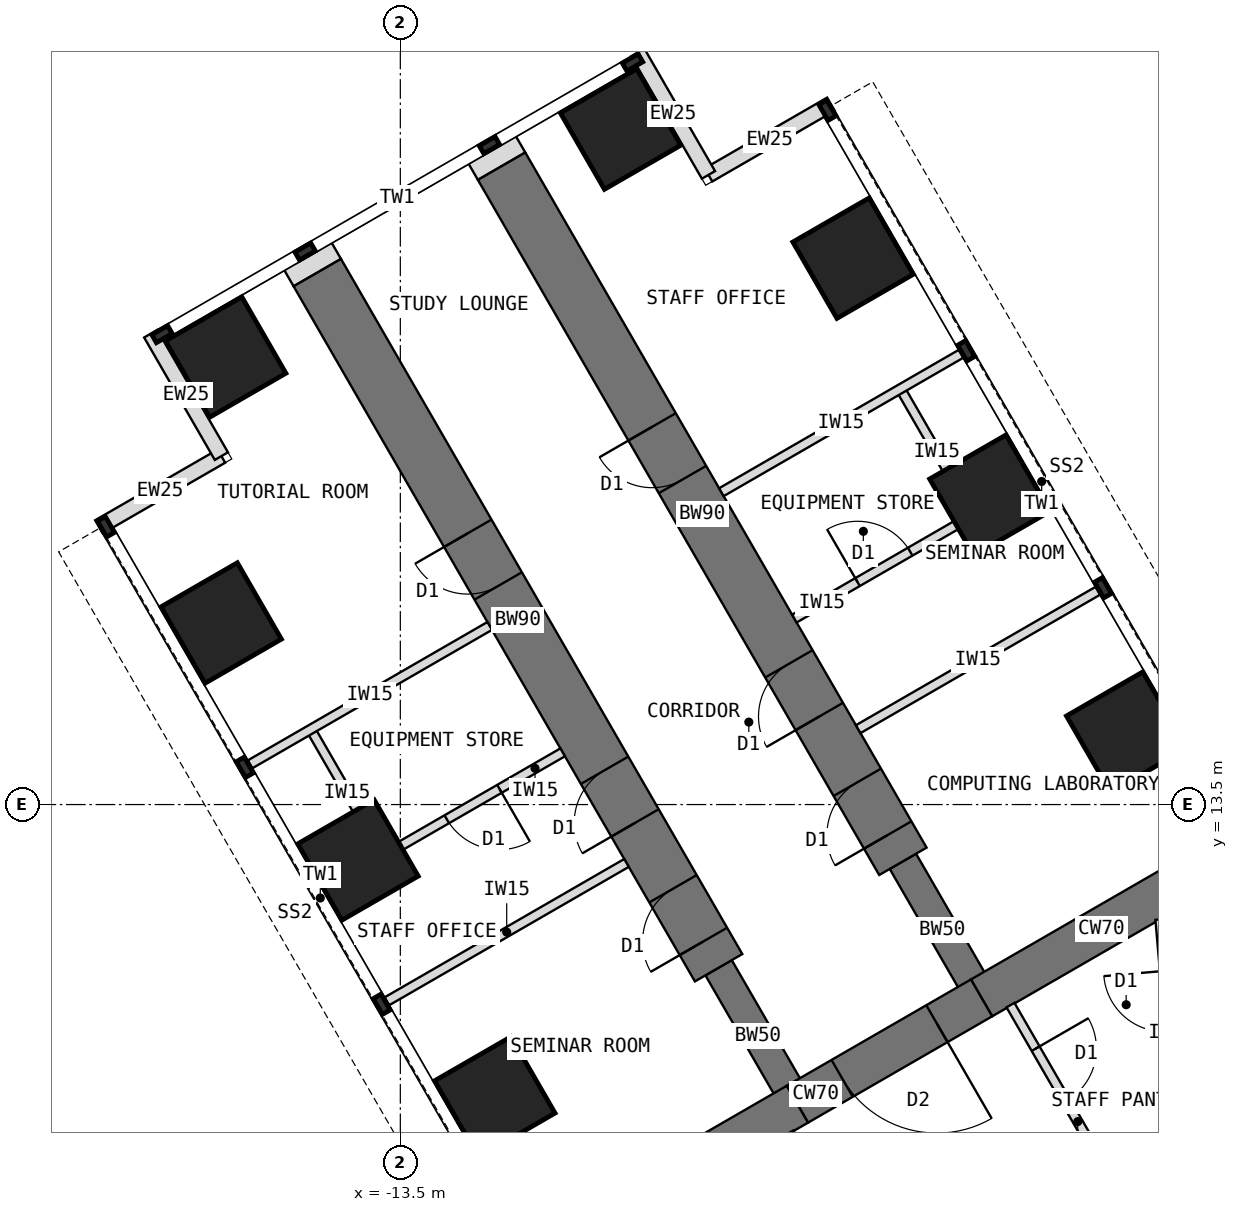
"""IFC4 building model, lengths in metres.
Left out: names, types, materials, properties, quantities, classifications, styles, units other than length and angle.
Written with IfcOpenShell. Run it as: python <this file> out.ifc"""

import sys

from ifc_helpers import new_model, si_unit, direction, frame, frame_2d, origin, origin_2d, place, context, subcontext, project, spatial, rectangle, extrude, element, fill, save


model = new_model("IFC4")
c1 = context("Model", 3, precision=1e-05, world=origin(), true_north=direction((0.0, 1.0)))
c2 = subcontext(c1, "Body", "Model", "MODEL_VIEW")
j1 = project(units=[si_unit("LENGTHUNIT", "METRE"), si_unit("PLANEANGLEUNIT", "RADIAN")], contexts=[c1])
p1 = place(None, origin())
s1 = spatial("IfcSite", under=j1, at=p1, CompositionType="ELEMENT")
p2 = place(p1, origin())
s2 = spatial("IfcBuilding", under=s1, at=p2, CompositionType="ELEMENT")
p3 = place(p2, frame((0.0, 0.0, 60.5)))
s3 = spatial("IfcBuildingStorey", under=s2, at=p3, CompositionType="ELEMENT", Elevation=60.5)
p4 = place(p3, frame((0.0, 12.596, 0.0), z_axis=(0.0, 0.0, 1.0), x_axis=(-0.866011268655, -0.500024481964, 0.0)))
e1 = element("IfcWall", 1, at=p4, inside=s3, PredefinedType="SHEAR", context=c2, shape_type="SweptSolid", body=[
    extrude(rectangle(XDim=4.548, YDim=0.7, at=frame_2d((2.274, 0.0))), origin(), (0.0, 0.0, 1.0), 4.0),
])
p5 = place(p3, frame((-3.939, 10.322, 0.0), z_axis=(0.0, 0.0, 1.0), x_axis=(-0.866019471182, -0.500010275428, 0.0)))
e2 = element("IfcWall", 2, at=p5, inside=s3, PredefinedType="SHEAR", context=c2, shape_type="SweptSolid", body=[
    extrude(rectangle(XDim=3.5, YDim=0.7, at=frame_2d((1.75, 0.0))), origin(), (0.0, 0.0, 1.0), 4.0),
])
p6 = place(p5, frame((0.85, 0.0, 0.0)))
e3 = element("IfcOpeningElement", 3, at=p6, cuts=e2, PredefinedType="OPENING", context=c2, shape_type="SweptSolid", body=[
    extrude(rectangle(XDim=1.8, YDim=2.1, at=frame_2d((0.9, 1.05))), frame((0.0, 0.36, 0.0), z_axis=(0.0, -1.0, 0.0), x_axis=(1.0, 0.0, 0.0)), (0.0, 0.0, 1.0), 0.72),
])
p7 = place(p3, frame((-6.97, 8.572, 0.0), z_axis=(0.0, 0.0, 1.0), x_axis=(-0.866034513004, -0.499984222037, 0.0)))
e4 = element("IfcWall", 4, at=p7, inside=s3, PredefinedType="SHEAR", context=c2, shape_type="SweptSolid", body=[
    extrude(rectangle(XDim=4.548, YDim=0.7, at=frame_2d((2.274, 0.0))), origin(), (0.0, 0.0, 1.0), 4.0),
])
p8 = place(p3, frame((-6.97, 8.572, 0.0), z_axis=(0.0, 0.0, 1.0), x_axis=(-0.499988811324, 0.866031863473, 0.0)))
e5 = element("IfcWall", 5, at=p8, inside=s3, PredefinedType="SHEAR", context=c2, shape_type="SweptSolid", body=[
    extrude(rectangle(XDim=2.592, YDim=0.5, at=frame_2d((1.296, 0.0))), origin(), (0.0, 0.0, 1.0), 4.0),
])
p9 = place(p3, frame((-8.266, 10.816, 0.0), z_axis=(0.0, 0.0, 1.0), x_axis=(-0.499996231654, 0.866027579429, 0.0)))
e6 = element("IfcWall", 6, at=p9, inside=s3, PredefinedType="SHEAR", context=c2, shape_type="SweptSolid", body=[
    extrude(rectangle(XDim=13.2, YDim=0.9, at=frame_2d((6.6, 0.0))), origin(), (0.0, 0.0, 1.0), 4.0),
])
p10 = place(p9, frame((0.5, 0.0, 0.0)))
e7 = element("IfcOpeningElement", 7, at=p10, cuts=e6, PredefinedType="OPENING", context=c2, shape_type="SweptSolid", body=[
    extrude(rectangle(XDim=1.0, YDim=2.1, at=frame_2d((0.5, 1.05))), frame((0.0, 0.46, 0.0), z_axis=(0.0, -1.0, 0.0), x_axis=(1.0, 0.0, 0.0)), (0.0, 0.0, 1.0), 0.92),
])
p11 = place(p9, frame((2.75, 0.0, 0.0)))
e8 = element("IfcOpeningElement", 8, at=p11, cuts=e6, PredefinedType="OPENING", context=c2, shape_type="SweptSolid", body=[
    extrude(rectangle(XDim=1.0, YDim=2.1, at=frame_2d((0.5, 1.05))), frame((0.0, 0.46, 0.0), z_axis=(0.0, -1.0, 0.0), x_axis=(1.0, 0.0, 0.0)), (0.0, 0.0, 1.0), 0.92),
])
p12 = place(p9, frame((7.25, 0.0, 0.0)))
e9 = element("IfcOpeningElement", 9, at=p12, cuts=e6, PredefinedType="OPENING", context=c2, shape_type="SweptSolid", body=[
    extrude(rectangle(XDim=1.0, YDim=2.1, at=frame_2d((0.5, 1.05))), frame((0.0, 0.46, 0.0), z_axis=(0.0, -1.0, 0.0), x_axis=(1.0, 0.0, 0.0)), (0.0, 0.0, 1.0), 0.92),
])
p13 = place(p3, frame((-3.939, 10.322, 0.0), z_axis=(0.0, 0.0, 1.0), x_axis=(-0.499918158782, 0.866072649678, 0.0)))
e10 = element("IfcWall", 10, at=p13, inside=s3, PredefinedType="SHEAR", context=c2, shape_type="SweptSolid", body=[
    extrude(rectangle(XDim=2.592, YDim=0.5, at=frame_2d((1.296, 0.0))), origin(), (0.0, 0.0, 1.0), 4.0),
])
p14 = place(p3, frame((-5.234, 12.566, 0.0), z_axis=(0.0, 0.0, 1.0), x_axis=(-0.500010103361, 0.866019570528, 0.0)))
e11 = element("IfcWall", 11, at=p14, inside=s3, PredefinedType="SHEAR", context=c2, shape_type="SweptSolid", body=[
    extrude(rectangle(XDim=13.2, YDim=0.9, at=frame_2d((6.6, 0.0))), origin(), (0.0, 0.0, 1.0), 4.0),
])
p15 = place(p14, frame((0.5, 0.0, 0.0)))
e12 = element("IfcOpeningElement", 12, at=p15, cuts=e11, PredefinedType="OPENING", context=c2, shape_type="SweptSolid", body=[
    extrude(rectangle(XDim=1.0, YDim=2.1, at=frame_2d((0.5, 1.05))), frame((0.0, 0.46, 0.0), z_axis=(0.0, -1.0, 0.0), x_axis=(1.0, 0.0, 0.0)), (0.0, 0.0, 1.0), 0.92),
])
p16 = place(p14, frame((2.75, 0.0, 0.0)))
e13 = element("IfcOpeningElement", 13, at=p16, cuts=e11, PredefinedType="OPENING", context=c2, shape_type="SweptSolid", body=[
    extrude(rectangle(XDim=1.0, YDim=2.1, at=frame_2d((0.5, 1.05))), frame((0.0, 0.46, 0.0), z_axis=(0.0, -1.0, 0.0), x_axis=(1.0, 0.0, 0.0)), (0.0, 0.0, 1.0), 0.92),
])
p17 = place(p14, frame((7.25, 0.0, 0.0)))
e14 = element("IfcOpeningElement", 14, at=p17, cuts=e11, PredefinedType="OPENING", context=c2, shape_type="SweptSolid", body=[
    extrude(rectangle(XDim=1.0, YDim=2.1, at=frame_2d((0.5, 1.05))), frame((0.0, 0.46, 0.0), z_axis=(0.0, -1.0, 0.0), x_axis=(1.0, 0.0, 0.0)), (0.0, 0.0, 1.0), 0.92),
])
for number, where, z_axis, x_axis in (
    (15, (-11.946, 8.691, 0.0), (0.0, 0.0, 1.0), (0.866, 0.5, 0.0)),
    (16, (-1.554, 14.691, 0.0), (0.0, 0.0, 1.0), (0.866, 0.5, 0.0)),
    (17, (-14.196, 12.588, 0.0), (0.0, 0.0, 1.0), (0.866, 0.5, 0.0)),
    (18, (-3.804, 18.588, 0.0), (0.0, 0.0, 1.0), (0.866, 0.5, 0.0)),
    (19, (-16.446, 16.486, 0.0), (0.0, 0.0, 1.0), (0.866, 0.5, 0.0)),
    (20, (-6.054, 22.486, 0.0), (0.0, 0.0, 1.0), (0.866, 0.5, 0.0)),
    (21, (-16.373, 20.858, 0.0), (0.0, 0.0, 1.0), (0.866, 0.5, 0.0)),
    (22, (-9.877, 24.608, 0.0), (0.0, 0.0, 1.0), (0.866, 0.5, 0.0)),
):
    element("IfcColumn", number, at=place(p3, frame(where, z_axis=z_axis, x_axis=x_axis)), inside=s3, PredefinedType="COLUMN", context=c2, shape_type="SweptSolid", body=[
        extrude(rectangle(XDim=1.45, YDim=1.45, at=origin_2d()), origin(), (0.0, 0.0, 1.0), 4.0),
    ])
for number, where, z_axis, x_axis in (
    (23, (-18.456, 18.067, 0.0), (0.0, 0.0, 1.0), (0.866, 0.5, 0.0)),
    (24, (-16.443, 19.23, 0.0), (0.0, 0.0, 1.0), (-0.5, 0.866, 0.0)),
    (25, (-6.419, 25.017, 0.0), (0.0, 0.0, 1.0), (-0.866, -0.5, 0.0)),
    (26, (-8.432, 23.855, 0.0), (0.0, 0.0, 1.0), (-0.5, 0.866, 0.0)),
):
    element("IfcWall", number, at=place(p3, frame(where, z_axis=z_axis, x_axis=x_axis)), inside=s3, PredefinedType="STANDARD", context=c2, shape_type="SweptSolid", body=[
        extrude(rectangle(XDim=2.325, YDim=0.25, at=frame_2d((1.163, 0.0))), origin(), (0.0, 0.0, 1.0), 3.8),
    ])
for number, where, z_axis, x_axis in (
    (27, (-14.865, 22.248, 0.0), (0.0, 0.0, 1.0), (-0.5, 0.866, 0.0)),
    (28, (-11.834, 23.998, 0.0), (0.0, 0.0, 1.0), (-0.5, 0.866, 0.0)),
):
    element("IfcWall", number, at=place(p3, frame(where, z_axis=z_axis, x_axis=x_axis)), inside=s3, PredefinedType="PARTITIONING", context=c2, shape_type="SweptSolid", body=[
        extrude(rectangle(XDim=0.31, YDim=0.9, at=frame_2d((0.155, 0.0))), origin(), (0.0, 0.0, 1.0), 3.8),
    ])
p18 = place(p3, frame((-1.201, 6.12, 0.0), z_axis=(0.0, 0.0, 1.0), x_axis=(0.500002627198, 0.866023886965, 0.0)))
e29 = element("IfcWall", 29, at=p18, inside=s3, PredefinedType="SHEAR", context=c2, shape_type="SweptSolid", body=[
    extrude(rectangle(XDim=5.858, YDim=0.4, at=frame_2d((2.929, 0.0))), origin(), (0.0, 0.0, 1.0), 4.0),
])
for number, where, z_axis, x_axis in (
    (30, (-9.78, 12.54, 0.0), (0.0, 0.0, 1.0), (-0.866, -0.5, 0.0)),
    (31, (-12.03, 16.437, 0.0), (0.0, 0.0, 1.0), (-0.866, -0.5, 0.0)),
):
    element("IfcWall", number, at=place(p3, frame(where, z_axis=z_axis, x_axis=x_axis)), inside=s3, PredefinedType="PARTITIONING", context=c2, shape_type="SweptSolid", body=[
        extrude(rectangle(XDim=4.55, YDim=0.15, at=frame_2d((2.275, 0.0))), origin(), (0.0, 0.0, 1.0), 3.8),
    ])
p19 = place(p3, frame((-13.775, 12.658, 0.0), z_axis=(0.0, 0.0, 1.0), x_axis=(-0.500033551112, 0.866006032174, 0.0)))
e32 = element("IfcWall", 32, at=p19, inside=s3, PredefinedType="PARTITIONING", context=c2, shape_type="SweptSolid", body=[
    extrude(rectangle(XDim=2.4, YDim=0.15, at=frame_2d((1.2, 0.0))), origin(), (0.0, 0.0, 1.0), 3.8),
])
p20 = place(p3, frame((-10.83, 14.359, 0.0), z_axis=(0.0, 0.0, 1.0), x_axis=(-0.865989465428, -0.500062241894, 0.0)))
e33 = element("IfcWall", 33, at=p20, inside=s3, PredefinedType="PARTITIONING", context=c2, shape_type="SweptSolid", body=[
    extrude(rectangle(XDim=3.4, YDim=0.15, at=frame_2d((1.7, 0.0))), origin(), (0.0, 0.0, 1.0), 3.8),
])
p21 = place(p20, frame((1.2, 0.0, 0.0)))
e34 = element("IfcOpeningElement", 34, at=p21, cuts=e33, PredefinedType="OPENING", context=c2, shape_type="SweptSolid", body=[
    extrude(rectangle(XDim=1.0, YDim=2.1, at=frame_2d((0.5, 1.05))), frame((0.0, 0.085, 0.0), z_axis=(0.0, -1.0, 0.0), x_axis=(1.0, 0.0, 0.0)), (0.0, 0.0, 1.0), 0.17),
])
for number, where, z_axis, x_axis in (
    (35, (-5.97, 14.74, 0.0), (0.0, 0.0, 1.0), (0.866, 0.5, 0.0)),
    (36, (-8.22, 18.637, 0.0), (0.0, 0.0, 1.0), (0.866, 0.5, 0.0)),
):
    element("IfcWall", number, at=place(p3, frame(where, z_axis=z_axis, x_axis=x_axis)), inside=s3, PredefinedType="PARTITIONING", context=c2, shape_type="SweptSolid", body=[
        extrude(rectangle(XDim=4.55, YDim=0.15, at=frame_2d((2.275, 0.0))), origin(), (0.0, 0.0, 1.0), 3.8),
    ])
p22 = place(p3, frame((-4.075, 18.259, 0.0), z_axis=(0.0, 0.0, 1.0), x_axis=(-0.500001309137, 0.866024647952, 0.0)))
e37 = element("IfcWall", 37, at=p22, inside=s3, PredefinedType="PARTITIONING", context=c2, shape_type="SweptSolid", body=[
    extrude(rectangle(XDim=2.4, YDim=0.15, at=frame_2d((1.2, 0.0))), origin(), (0.0, 0.0, 1.0), 3.8),
])
p23 = place(p3, frame((-7.02, 16.559, 0.0), z_axis=(0.0, 0.0, 1.0), x_axis=(0.866038511948, 0.499977295307, 0.0)))
e38 = element("IfcWall", 38, at=p23, inside=s3, PredefinedType="PARTITIONING", context=c2, shape_type="SweptSolid", body=[
    extrude(rectangle(XDim=3.4, YDim=0.15, at=frame_2d((1.7, 0.0))), origin(), (0.0, 0.0, 1.0), 3.8),
])
p24 = place(p23, frame((1.2, 0.0, 0.0)))
e39 = element("IfcOpeningElement", 39, at=p24, cuts=e38, PredefinedType="OPENING", context=c2, shape_type="SweptSolid", body=[
    extrude(rectangle(XDim=1.0, YDim=2.1, at=frame_2d((0.5, 1.05))), frame((0.0, 0.085, 0.0), z_axis=(0.0, -1.0, 0.0), x_axis=(1.0, 0.0, 0.0)), (0.0, 0.0, 1.0), 0.17),
])
p25 = place(p3, frame((-4.89, 4.27, 0.0), z_axis=(0.0, 0.0, 1.0), x_axis=(-0.500007369519, 0.866021148949, 0.0)))
e40 = element("IfcWall", 40, at=p25, inside=s3, PredefinedType="PARTITIONING", context=c2, shape_type="SweptSolid", body=[
    extrude(rectangle(XDim=4.426, YDim=0.15, at=frame_2d((2.213, 0.0))), origin(), (0.0, 0.0, 1.0), 3.8),
])
p26 = place(p25, frame((0.828, 0.0, 0.0)))
e41 = element("IfcOpeningElement", 41, at=p26, cuts=e40, PredefinedType="OPENING", context=c2, shape_type="SweptSolid", body=[
    extrude(rectangle(XDim=1.0, YDim=2.1, at=frame_2d((0.5, 1.05))), frame((0.0, 0.085, 0.0), z_axis=(0.0, -1.0, 0.0), x_axis=(1.0, 0.0, 0.0)), (0.0, 0.0, 1.0), 0.17),
])
p27 = place(p3, frame((-3.466, 10.202, 0.0), z_axis=(0.0, 0.0, 1.0), x_axis=(0.500007369519, -0.866021148949, 0.0)))
e42 = element("IfcWall", 42, at=p27, inside=s3, PredefinedType="PARTITIONING", context=c2, shape_type="SweptSolid", body=[
    extrude(rectangle(XDim=4.426, YDim=0.15, at=frame_2d((2.213, 0.0))), origin(), (0.0, 0.0, 1.0), 3.8),
])
p28 = place(p27, frame((0.828, 0.0, 0.0)))
e43 = element("IfcOpeningElement", 43, at=p28, cuts=e42, PredefinedType="OPENING", context=c2, shape_type="SweptSolid", body=[
    extrude(rectangle(XDim=1.0, YDim=2.1, at=frame_2d((0.5, 1.05))), frame((0.0, 0.085, 0.0), z_axis=(0.0, -1.0, 0.0), x_axis=(1.0, 0.0, 0.0)), (0.0, 0.0, 1.0), 0.17),
])
p29 = place(p3, frame((-0.618, 7.129, 0.0), z_axis=(0.0, 0.0, 1.0), x_axis=(-0.086409450071, 0.996259708579, 0.0)))
e44 = element("IfcWall", 44, at=p29, inside=s3, PredefinedType="PARTITIONING", context=c2, shape_type="SweptSolid", body=[
    extrude(rectangle(XDim=4.498, YDim=0.15, at=frame_2d((2.249, 0.0))), origin(), (0.0, 0.0, 1.0), 3.8),
])
p30 = place(p29, frame((2.648, 0.0, 0.0)))
e45 = element("IfcOpeningElement", 45, at=p30, cuts=e44, PredefinedType="OPENING", context=c2, shape_type="SweptSolid", body=[
    extrude(rectangle(XDim=1.0, YDim=2.1, at=frame_2d((0.5, 1.05))), frame((0.0, 0.085, 0.0), z_axis=(0.0, -1.0, 0.0), x_axis=(1.0, 0.0, 0.0)), (0.0, 0.0, 1.0), 0.17),
])
p31 = place(p6, origin())
e46 = element("IfcDoor", 46, at=p31, inside=s3, OperationType="DOUBLE_DOOR_DOUBLE_SWING", PredefinedType="DOOR", context=c2, shape_type="SweptSolid", body=[
    extrude(rectangle(XDim=1.72, YDim=2.06, at=frame_2d((0.9, 1.03))), frame((0.0, 0.025, 0.0), z_axis=(0.0, -1.0, 0.0), x_axis=(1.0, 0.0, 0.0)), (0.0, 0.0, 1.0), 0.05),
    extrude(rectangle(XDim=0.04, YDim=2.1, at=frame_2d((0.02, 1.05))), frame((0.0, 0.35, 0.0), z_axis=(0.0, -1.0, 0.0), x_axis=(1.0, 0.0, 0.0)), (0.0, 0.0, 1.0), 0.699),
    extrude(rectangle(XDim=0.04, YDim=2.1, at=frame_2d((1.78, 1.05))), frame((0.0, 0.35, 0.0), z_axis=(0.0, -1.0, 0.0), x_axis=(1.0, 0.0, 0.0)), (0.0, 0.0, 1.0), 0.699),
    extrude(rectangle(XDim=1.72, YDim=0.04, at=frame_2d((0.9, 2.08))), frame((0.0, 0.35, 0.0), z_axis=(0.0, -1.0, 0.0), x_axis=(1.0, 0.0, 0.0)), (0.0, 0.0, 1.0), 0.699),
])
fill(e3, e46)
p32 = place(p21, origin())
e47 = element("IfcDoor", 47, at=p32, inside=s3, OperationType="SINGLE_SWING_LEFT", PredefinedType="DOOR", context=c2, shape_type="SweptSolid", body=[
    extrude(rectangle(XDim=1.0, YDim=2.1, at=frame_2d((0.5, 1.05))), frame((0.0, 0.025, 0.0), z_axis=(0.0, -1.0, 0.0), x_axis=(1.0, 0.0, 0.0)), (0.0, 0.0, 1.0), 0.05),
])
fill(e34, e47)
p33 = place(p24, origin())
e48 = element("IfcDoor", 48, at=p33, inside=s3, OperationType="SINGLE_SWING_LEFT", PredefinedType="DOOR", context=c2, shape_type="SweptSolid", body=[
    extrude(rectangle(XDim=1.0, YDim=2.1, at=frame_2d((0.5, 1.05))), frame((0.0, 0.025, 0.0), z_axis=(0.0, -1.0, 0.0), x_axis=(1.0, 0.0, 0.0)), (0.0, 0.0, 1.0), 0.05),
])
fill(e39, e48)
p34 = place(p28, origin())
e49 = element("IfcDoor", 49, at=p34, inside=s3, OperationType="SINGLE_SWING_LEFT", PredefinedType="DOOR", context=c2, shape_type="SweptSolid", body=[
    extrude(rectangle(XDim=1.0, YDim=2.1, at=frame_2d((0.5, 1.05))), frame((0.0, 0.025, 0.0), z_axis=(0.0, -1.0, 0.0), x_axis=(1.0, 0.0, 0.0)), (0.0, 0.0, 1.0), 0.05),
])
fill(e43, e49)
p35 = place(p10, origin())
e50 = element("IfcDoor", 50, at=p35, inside=s3, OperationType="SINGLE_SWING_LEFT", PredefinedType="DOOR", context=c2, shape_type="SweptSolid", body=[
    extrude(rectangle(XDim=0.92, YDim=2.06, at=frame_2d((0.5, 1.03))), frame((0.0, 0.025, 0.0), z_axis=(0.0, -1.0, 0.0), x_axis=(1.0, 0.0, 0.0)), (0.0, 0.0, 1.0), 0.05),
    extrude(rectangle(XDim=0.04, YDim=2.1, at=frame_2d((0.02, 1.05))), frame((0.0, 0.45, 0.0), z_axis=(0.0, -1.0, 0.0), x_axis=(1.0, 0.0, 0.0)), (0.0, 0.0, 1.0), 0.899),
    extrude(rectangle(XDim=0.04, YDim=2.1, at=frame_2d((0.98, 1.05))), frame((0.0, 0.45, 0.0), z_axis=(0.0, -1.0, 0.0), x_axis=(1.0, 0.0, 0.0)), (0.0, 0.0, 1.0), 0.899),
    extrude(rectangle(XDim=0.92, YDim=0.04, at=frame_2d((0.5, 2.08))), frame((0.0, 0.45, 0.0), z_axis=(0.0, -1.0, 0.0), x_axis=(1.0, 0.0, 0.0)), (0.0, 0.0, 1.0), 0.899),
])
fill(e7, e50)
p36 = place(p11, origin())
e51 = element("IfcDoor", 51, at=p36, inside=s3, OperationType="SINGLE_SWING_LEFT", PredefinedType="DOOR", context=c2, shape_type="SweptSolid", body=[
    extrude(rectangle(XDim=0.92, YDim=2.06, at=frame_2d((0.5, 1.03))), frame((0.0, 0.025, 0.0), z_axis=(0.0, -1.0, 0.0), x_axis=(1.0, 0.0, 0.0)), (0.0, 0.0, 1.0), 0.05),
    extrude(rectangle(XDim=0.04, YDim=2.1, at=frame_2d((0.02, 1.05))), frame((0.0, 0.45, 0.0), z_axis=(0.0, -1.0, 0.0), x_axis=(1.0, 0.0, 0.0)), (0.0, 0.0, 1.0), 0.899),
    extrude(rectangle(XDim=0.04, YDim=2.1, at=frame_2d((0.98, 1.05))), frame((0.0, 0.45, 0.0), z_axis=(0.0, -1.0, 0.0), x_axis=(1.0, 0.0, 0.0)), (0.0, 0.0, 1.0), 0.899),
    extrude(rectangle(XDim=0.92, YDim=0.04, at=frame_2d((0.5, 2.08))), frame((0.0, 0.45, 0.0), z_axis=(0.0, -1.0, 0.0), x_axis=(1.0, 0.0, 0.0)), (0.0, 0.0, 1.0), 0.899),
])
fill(e8, e51)
p37 = place(p12, origin())
e52 = element("IfcDoor", 52, at=p37, inside=s3, OperationType="SINGLE_SWING_RIGHT", PredefinedType="DOOR", context=c2, shape_type="SweptSolid", body=[
    extrude(rectangle(XDim=0.92, YDim=2.06, at=frame_2d((0.5, 1.03))), frame((0.0, 0.025, 0.0), z_axis=(0.0, -1.0, 0.0), x_axis=(1.0, 0.0, 0.0)), (0.0, 0.0, 1.0), 0.05),
    extrude(rectangle(XDim=0.04, YDim=2.1, at=frame_2d((0.02, 1.05))), frame((0.0, 0.45, 0.0), z_axis=(0.0, -1.0, 0.0), x_axis=(1.0, 0.0, 0.0)), (0.0, 0.0, 1.0), 0.899),
    extrude(rectangle(XDim=0.04, YDim=2.1, at=frame_2d((0.98, 1.05))), frame((0.0, 0.45, 0.0), z_axis=(0.0, -1.0, 0.0), x_axis=(1.0, 0.0, 0.0)), (0.0, 0.0, 1.0), 0.899),
    extrude(rectangle(XDim=0.92, YDim=0.04, at=frame_2d((0.5, 2.08))), frame((0.0, 0.45, 0.0), z_axis=(0.0, -1.0, 0.0), x_axis=(1.0, 0.0, 0.0)), (0.0, 0.0, 1.0), 0.899),
])
fill(e9, e52)
p38 = place(p15, origin())
e53 = element("IfcDoor", 53, at=p38, inside=s3, OperationType="SINGLE_SWING_LEFT", PredefinedType="DOOR", context=c2, shape_type="SweptSolid", body=[
    extrude(rectangle(XDim=0.92, YDim=2.06, at=frame_2d((0.5, 1.03))), frame((0.0, 0.025, 0.0), z_axis=(0.0, -1.0, 0.0), x_axis=(1.0, 0.0, 0.0)), (0.0, 0.0, 1.0), 0.05),
    extrude(rectangle(XDim=0.04, YDim=2.1, at=frame_2d((0.02, 1.05))), frame((0.0, 0.45, 0.0), z_axis=(0.0, -1.0, 0.0), x_axis=(1.0, 0.0, 0.0)), (0.0, 0.0, 1.0), 0.899),
    extrude(rectangle(XDim=0.04, YDim=2.1, at=frame_2d((0.98, 1.05))), frame((0.0, 0.45, 0.0), z_axis=(0.0, -1.0, 0.0), x_axis=(1.0, 0.0, 0.0)), (0.0, 0.0, 1.0), 0.899),
    extrude(rectangle(XDim=0.92, YDim=0.04, at=frame_2d((0.5, 2.08))), frame((0.0, 0.45, 0.0), z_axis=(0.0, -1.0, 0.0), x_axis=(1.0, 0.0, 0.0)), (0.0, 0.0, 1.0), 0.899),
])
fill(e12, e53)
p39 = place(p16, origin())
e54 = element("IfcDoor", 54, at=p39, inside=s3, OperationType="SINGLE_SWING_LEFT", PredefinedType="DOOR", context=c2, shape_type="SweptSolid", body=[
    extrude(rectangle(XDim=0.92, YDim=2.06, at=frame_2d((0.5, 1.03))), frame((0.0, 0.025, 0.0), z_axis=(0.0, -1.0, 0.0), x_axis=(1.0, 0.0, 0.0)), (0.0, 0.0, 1.0), 0.05),
    extrude(rectangle(XDim=0.04, YDim=2.1, at=frame_2d((0.02, 1.05))), frame((0.0, 0.45, 0.0), z_axis=(0.0, -1.0, 0.0), x_axis=(1.0, 0.0, 0.0)), (0.0, 0.0, 1.0), 0.899),
    extrude(rectangle(XDim=0.04, YDim=2.1, at=frame_2d((0.98, 1.05))), frame((0.0, 0.45, 0.0), z_axis=(0.0, -1.0, 0.0), x_axis=(1.0, 0.0, 0.0)), (0.0, 0.0, 1.0), 0.899),
    extrude(rectangle(XDim=0.92, YDim=0.04, at=frame_2d((0.5, 2.08))), frame((0.0, 0.45, 0.0), z_axis=(0.0, -1.0, 0.0), x_axis=(1.0, 0.0, 0.0)), (0.0, 0.0, 1.0), 0.899),
])
fill(e13, e54)
p40 = place(p17, origin())
e55 = element("IfcDoor", 55, at=p40, inside=s3, OperationType="SINGLE_SWING_RIGHT", PredefinedType="DOOR", context=c2, shape_type="SweptSolid", body=[
    extrude(rectangle(XDim=0.92, YDim=2.06, at=frame_2d((0.5, 1.03))), frame((0.0, 0.025, 0.0), z_axis=(0.0, -1.0, 0.0), x_axis=(1.0, 0.0, 0.0)), (0.0, 0.0, 1.0), 0.05),
    extrude(rectangle(XDim=0.04, YDim=2.1, at=frame_2d((0.02, 1.05))), frame((0.0, 0.45, 0.0), z_axis=(0.0, -1.0, 0.0), x_axis=(1.0, 0.0, 0.0)), (0.0, 0.0, 1.0), 0.899),
    extrude(rectangle(XDim=0.04, YDim=2.1, at=frame_2d((0.98, 1.05))), frame((0.0, 0.45, 0.0), z_axis=(0.0, -1.0, 0.0), x_axis=(1.0, 0.0, 0.0)), (0.0, 0.0, 1.0), 0.899),
    extrude(rectangle(XDim=0.92, YDim=0.04, at=frame_2d((0.5, 2.08))), frame((0.0, 0.45, 0.0), z_axis=(0.0, -1.0, 0.0), x_axis=(1.0, 0.0, 0.0)), (0.0, 0.0, 1.0), 0.899),
])
fill(e14, e55)
save(model, sys.argv[1])
